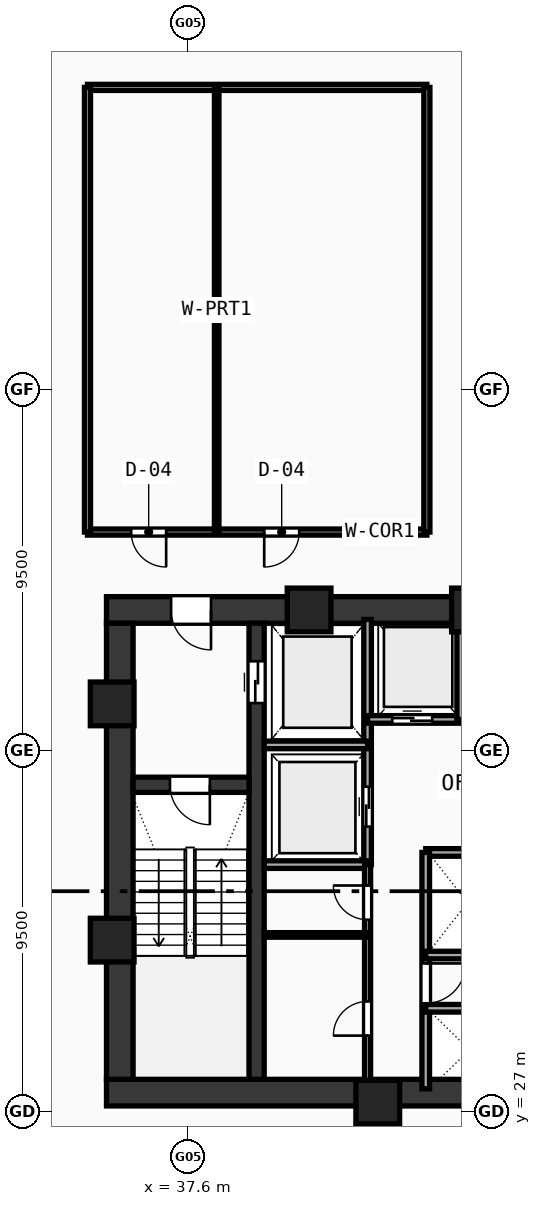
"""IFC4 building model, lengths in metres.
Left out: names, types, materials, properties, quantities, classifications, styles, units other than length and angle.
Written with IfcOpenShell. Run it as: python <this file> out.ifc"""

import sys

from ifc_helpers import new_model, si_unit, direction, frame, frame_2d, origin, origin_with_axes, origin_2d, place, context, subcontext, project, spatial, rectangle, hollow_rectangle, extrude, source, transform, mapped, element, fill, save


model = new_model("IFC4")
c1 = context("Model", 3, precision=1e-05, world=origin(), true_north=direction((0.0, 1.0)))
c2 = subcontext(c1, "Body", "Model", "MODEL_VIEW")
j1 = project(units=[si_unit("LENGTHUNIT", "METRE"), si_unit("PLANEANGLEUNIT", "RADIAN")], contexts=[c1])
p1 = place(None, origin())
s1 = spatial("IfcSite", under=j1, at=p1, CompositionType="ELEMENT")
p2 = place(p1, origin())
s2 = spatial("IfcBuilding", under=s1, at=p2, CompositionType="ELEMENT")
p3 = place(p2, frame((0.0, 0.0, 66.7)))
s3 = spatial("IfcBuildingStorey", under=s2, at=p3, CompositionType="ELEMENT", Elevation=66.7)
p4 = place(p3, frame((35.45, 27.5, 0.0), z_axis=(0.0, 0.0, 1.0), x_axis=(1.0, 0.0, 0.0)))
e1 = element("IfcWall", 1, at=p4, inside=s3, PredefinedType="SHEAR", context=c2, shape_type="SweptSolid", body=[
    extrude(rectangle(XDim=25.1, YDim=0.7, at=frame_2d((12.55, 0.0))), origin(), (0.0, 0.0, 1.0), 3.37),
])
p5 = place(p3, frame((35.45, 40.2, 0.0), z_axis=(0.0, 0.0, 1.0), x_axis=(1.0, 0.0, 0.0)))
e2 = element("IfcWall", 2, at=p5, inside=s3, PredefinedType="SHEAR", context=c2, shape_type="SweptSolid", body=[
    extrude(rectangle(XDim=11.35, YDim=0.7, at=frame_2d((5.675, 0.0))), origin(), (0.0, 0.0, 1.0), 3.37),
])
p6 = place(p5, frame((1.7, 0.0, 0.0)))
e3 = element("IfcOpeningElement", 3, at=p6, cuts=e2, PredefinedType="OPENING", context=c2, shape_type="SweptSolid", body=[
    extrude(rectangle(XDim=1.05, YDim=2.1, at=frame_2d((0.525, 1.05))), frame((0.0, 0.36, 0.0), z_axis=(0.0, -1.0, 0.0), x_axis=(1.0, 0.0, 0.0)), (0.0, 0.0, 1.0), 0.72),
])
p7 = place(p3, frame((35.8, 27.85, 0.0), z_axis=(0.0, 0.0, 1.0), x_axis=(0.0, 1.0, 0.0)))
e4 = element("IfcWall", 4, at=p7, inside=s3, PredefinedType="SHEAR", context=c2, shape_type="SweptSolid", body=[
    extrude(rectangle(XDim=12.0, YDim=0.7, at=frame_2d((6.0, 0.0))), origin(), (0.0, 0.0, 1.0), 3.37),
])
p8 = place(p3, frame((39.4, 27.85, 0.0), z_axis=(0.0, 0.0, 1.0), x_axis=(0.0, 1.0, 0.0)))
e5 = element("IfcWall", 5, at=p8, inside=s3, PredefinedType="SHEAR", context=c2, shape_type="SweptSolid", body=[
    extrude(rectangle(XDim=12.0, YDim=0.4, at=frame_2d((6.0, 0.0))), origin(), (0.0, 0.0, 1.0), 3.37),
])
p9 = place(p8, frame((9.9, 0.0, 0.0)))
e6 = element("IfcOpeningElement", 6, at=p9, cuts=e5, PredefinedType="OPENING", context=c2, shape_type="SweptSolid", body=[
    extrude(rectangle(XDim=1.1, YDim=2.1, at=frame_2d((0.55, 1.05))), frame((0.0, 0.21, 0.0), z_axis=(0.0, -1.0, 0.0), x_axis=(1.0, 0.0, 0.0)), (0.0, 0.0, 1.0), 0.42),
])
p10 = place(p3, frame((36.15, 35.6, 0.0), z_axis=(0.0, 0.0, 1.0), x_axis=(1.0, 0.0, 0.0)))
e7 = element("IfcWall", 7, at=p10, inside=s3, PredefinedType="SHEAR", context=c2, shape_type="SweptSolid", body=[
    extrude(rectangle(XDim=3.05, YDim=0.4, at=frame_2d((1.525, 0.0))), origin(), (0.0, 0.0, 1.0), 3.37),
])
p11 = place(p10, frame((0.97, 0.0, 0.0)))
e8 = element("IfcOpeningElement", 8, at=p11, cuts=e7, PredefinedType="OPENING", context=c2, shape_type="SweptSolid", body=[
    extrude(rectangle(XDim=1.05, YDim=2.1, at=frame_2d((0.525, 1.05))), frame((0.0, 0.21, 0.0), z_axis=(0.0, -1.0, 0.0), x_axis=(1.0, 0.0, 0.0)), (0.0, 0.0, 1.0), 0.42),
])
m1 = source(origin(), c2, "Body", "SweptSolid", [
    extrude(hollow_rectangle(XDim=1.15, YDim=1.15, WallThickness=0.048, at=origin_2d()), origin(), (0.0, 0.0, 1.0), 3.63),
])
for number, where, z_axis, x_axis in (
    (9, (42.588, 27.25, -0.26), (0.0, 0.0, 1.0), (1.0, 0.0, 0.0)),
    (10, (45.106, 40.2, -0.26), (0.0, 0.0, 1.0), (1.0, 0.0, 0.0)),
    (11, (40.781, 40.2, -0.26), (0.0, 0.0, 1.0), (1.0, 0.0, 0.0)),
    (12, (35.6, 37.729, -0.26), (0.0, 0.0, 1.0), (1.0, 0.0, 0.0)),
    (13, (35.6, 31.513, -0.26), (0.0, 0.0, 1.0), (1.0, 0.0, 0.0)),
):
    element("IfcColumn", number, at=place(p3, frame(where, z_axis=z_axis, x_axis=x_axis)), inside=s3, PredefinedType="COLUMN", context=c2, shape_type="MappedRepresentation", body=[
        mapped(m1, transform((0.0, 0.0, 0.0), scale=1.0)),
    ])
p12 = place(p3, frame((42.32, 33.5, 0.0), z_axis=(0.0, 0.0, 1.0), x_axis=(0.0, 1.0, 0.0)))
e14 = element("IfcWall", 14, at=p12, inside=s3, PredefinedType="SOLIDWALL", context=c2, shape_type="SweptSolid", body=[
    extrude(rectangle(XDim=6.45, YDim=0.2, at=frame_2d((3.225, 0.0))), origin(), (0.0, 0.0, 1.0), 3.37),
])
p13 = place(p12, frame((1.0, 0.0, 0.0)))
e15 = element("IfcOpeningElement", 15, at=p13, cuts=e14, PredefinedType="OPENING", context=c2, shape_type="SweptSolid", body=[
    extrude(rectangle(XDim=1.05, YDim=2.1, at=frame_2d((0.525, 1.05))), frame((0.0, 0.11, 0.0), z_axis=(0.0, -1.0, 0.0), x_axis=(1.0, 0.0, 0.0)), (0.0, 0.0, 1.0), 0.22),
])
for number, where, z_axis, x_axis in (
    (16, (39.6, 36.65, 0.0), (0.0, 0.0, 1.0), (1.0, 0.0, 0.0)),
    (17, (39.6, 33.5, 0.0), (0.0, 0.0, 1.0), (1.0, 0.0, 0.0)),
):
    element("IfcWall", number, at=place(p3, frame(where, z_axis=z_axis, x_axis=x_axis)), inside=s3, PredefinedType="SOLIDWALL", context=c2, shape_type="SweptSolid", body=[
        extrude(rectangle(XDim=2.72, YDim=0.2, at=frame_2d((1.36, 0.0))), origin(), (0.0, 0.0, 1.0), 3.37),
    ])
p14 = place(p3, frame((42.32, 37.32, 0.0), z_axis=(0.0, 0.0, 1.0), x_axis=(1.0, 0.0, 0.0)))
e18 = element("IfcWall", 18, at=p14, inside=s3, PredefinedType="SOLIDWALL", context=c2, shape_type="SweptSolid", body=[
    extrude(rectangle(XDim=4.73, YDim=0.2, at=frame_2d((2.365, 0.0))), origin(), (0.0, 0.0, 1.0), 3.37),
])
p15 = place(p14, frame((0.65, 0.0, 0.0)))
e19 = element("IfcOpeningElement", 19, at=p15, cuts=e18, PredefinedType="OPENING", context=c2, shape_type="SweptSolid", body=[
    extrude(rectangle(XDim=1.05, YDim=2.1, at=frame_2d((0.525, 1.05))), frame((0.0, 0.11, 0.0), z_axis=(0.0, -1.0, 0.0), x_axis=(1.0, 0.0, 0.0)), (0.0, 0.0, 1.0), 0.22),
])
p16 = place(p14, frame((2.95, 0.0, 0.0)))
e20 = element("IfcOpeningElement", 20, at=p16, cuts=e18, PredefinedType="OPENING", context=c2, shape_type="SweptSolid", body=[
    extrude(rectangle(XDim=1.05, YDim=2.1, at=frame_2d((0.525, 1.05))), frame((0.0, 0.11, 0.0), z_axis=(0.0, -1.0, 0.0), x_axis=(1.0, 0.0, 0.0)), (0.0, 0.0, 1.0), 0.22),
])
p17 = place(p3, frame((44.77, 37.32, 0.0), z_axis=(0.0, 0.0, 1.0), x_axis=(0.0, 1.0, 0.0)))
e21 = element("IfcWall", 21, at=p17, inside=s3, PredefinedType="SOLIDWALL", context=c2, shape_type="SweptSolid", body=[
    extrude(rectangle(XDim=2.63, YDim=0.2, at=frame_2d((1.315, 0.0))), origin(), (0.0, 0.0, 1.0), 3.37),
])
p18 = place(p3, frame((43.85, 33.82, 0.0), z_axis=(0.0, 0.0, 1.0), x_axis=(1.0, 0.0, 0.0)))
e22 = element("IfcWall", 22, at=p18, inside=s3, PredefinedType="SOLIDWALL", context=c2, shape_type="SweptSolid", body=[
    extrude(rectangle(XDim=9.83, YDim=0.2, at=frame_2d((4.915, 0.0))), origin(), (0.0, 0.0, 1.0), 3.37),
])
p19 = place(p3, frame((43.85, 27.6, 0.0), z_axis=(0.0, 0.0, 1.0), x_axis=(0.0, 1.0, 0.0)))
e23 = element("IfcWall", 23, at=p19, inside=s3, PredefinedType="SOLIDWALL", context=c2, shape_type="SweptSolid", body=[
    extrude(rectangle(XDim=6.22, YDim=0.2, at=frame_2d((3.11, 0.0))), origin(), (0.0, 0.0, 1.0), 3.37),
])
p20 = place(p19, frame((2.25, 0.0, 0.0)))
e24 = element("IfcOpeningElement", 24, at=p20, cuts=e23, PredefinedType="OPENING", context=c2, shape_type="SweptSolid", body=[
    extrude(rectangle(XDim=1.05, YDim=2.1, at=frame_2d((0.525, 1.05))), frame((0.0, 0.11, 0.0), z_axis=(0.0, -1.0, 0.0), x_axis=(1.0, 0.0, 0.0)), (0.0, 0.0, 1.0), 0.22),
])
p21 = place(p3, frame((43.85, 29.72, 0.0), z_axis=(0.0, 0.0, 1.0), x_axis=(1.0, 0.0, 0.0)))
e25 = element("IfcWall", 25, at=p21, inside=s3, PredefinedType="SOLIDWALL", context=c2, shape_type="SweptSolid", body=[
    extrude(rectangle(XDim=7.2, YDim=0.2, at=frame_2d((3.6, 0.0))), origin(), (0.0, 0.0, 1.0), 3.37),
])
p22 = place(p3, frame((43.85, 31.12, 0.0), z_axis=(0.0, 0.0, 1.0), x_axis=(1.0, 0.0, 0.0)))
e26 = element("IfcWall", 26, at=p22, inside=s3, PredefinedType="SOLIDWALL", context=c2, shape_type="SweptSolid", body=[
    extrude(rectangle(XDim=9.83, YDim=0.2, at=frame_2d((4.915, 0.0))), origin(), (0.0, 0.0, 1.0), 3.37),
])
p23 = place(p3, frame((42.32, 27.6, 0.0), z_axis=(0.0, 0.0, 1.0), x_axis=(0.0, 1.0, 0.0)))
e27 = element("IfcWall", 27, at=p23, inside=s3, PredefinedType="PARTITIONING", context=c2, shape_type="SweptSolid", body=[
    extrude(rectangle(XDim=5.9, YDim=0.16, at=frame_2d((2.95, 0.0))), origin(), (0.0, 0.0, 1.0), 3.37),
])
p24 = place(p23, frame((1.4, 0.0, 0.0)))
e28 = element("IfcOpeningElement", 28, at=p24, cuts=e27, PredefinedType="OPENING", context=c2, shape_type="SweptSolid", body=[
    extrude(rectangle(XDim=0.9, YDim=2.1, at=frame_2d((0.45, 1.05))), frame((0.0, 0.09, 0.0), z_axis=(0.0, -1.0, 0.0), x_axis=(1.0, 0.0, 0.0)), (0.0, 0.0, 1.0), 0.18),
])
p25 = place(p23, frame((4.45, 0.0, 0.0)))
e29 = element("IfcOpeningElement", 29, at=p25, cuts=e27, PredefinedType="OPENING", context=c2, shape_type="SweptSolid", body=[
    extrude(rectangle(XDim=0.9, YDim=2.1, at=frame_2d((0.45, 1.05))), frame((0.0, 0.09, 0.0), z_axis=(0.0, -1.0, 0.0), x_axis=(1.0, 0.0, 0.0)), (0.0, 0.0, 1.0), 0.18),
])
p26 = place(p3, frame((39.6, 31.65, 0.0), z_axis=(0.0, 0.0, 1.0), x_axis=(1.0, 0.0, 0.0)))
e30 = element("IfcWall", 30, at=p26, inside=s3, PredefinedType="PARTITIONING", context=c2, shape_type="SweptSolid", body=[
    extrude(rectangle(XDim=2.72, YDim=0.12, at=frame_2d((1.36, 0.0))), origin(), (0.0, 0.0, 1.0), 3.37),
])
p27 = place(p3, frame((34.95, 42.25, 0.0), z_axis=(0.0, 0.0, 1.0), x_axis=(1.0, 0.0, 0.0)))
e31 = element("IfcWall", 31, at=p27, inside=s3, PredefinedType="PARTITIONING", context=c2, shape_type="SweptSolid", body=[
    extrude(rectangle(XDim=8.93, YDim=0.16, at=frame_2d((4.465, 0.0))), origin(), (0.0, 0.0, 1.0), 2.67),
])
p28 = place(p27, frame((1.15, 0.0, 0.0)))
e32 = element("IfcOpeningElement", 32, at=p28, cuts=e31, PredefinedType="OPENING", context=c2, shape_type="SweptSolid", body=[
    extrude(rectangle(XDim=0.92, YDim=2.1, at=frame_2d((0.46, 1.05))), frame((0.0, 0.09, 0.0), z_axis=(0.0, -1.0, 0.0), x_axis=(1.0, 0.0, 0.0)), (0.0, 0.0, 1.0), 0.18),
])
p29 = place(p27, frame((4.65, 0.0, 0.0)))
e33 = element("IfcOpeningElement", 33, at=p29, cuts=e31, PredefinedType="OPENING", context=c2, shape_type="SweptSolid", body=[
    extrude(rectangle(XDim=0.92, YDim=2.1, at=frame_2d((0.46, 1.05))), frame((0.0, 0.09, 0.0), z_axis=(0.0, -1.0, 0.0), x_axis=(1.0, 0.0, 0.0)), (0.0, 0.0, 1.0), 0.18),
])
p30 = place(p3, frame((34.95, 53.95, 0.0), z_axis=(0.0, 0.0, 1.0), x_axis=(1.0, 0.0, 0.0)))
e34 = element("IfcWall", 34, at=p30, inside=s3, PredefinedType="PARTITIONING", context=c2, shape_type="SweptSolid", body=[
    extrude(rectangle(XDim=8.93, YDim=0.16, at=frame_2d((4.465, 0.0))), origin(), (0.0, 0.0, 1.0), 2.67),
])
for number, where, z_axis, x_axis in (
    (35, (34.95, 42.25, 0.0), (0.0, 0.0, 1.0), (0.0, 1.0, 0.0)),
    (36, (43.88, 42.25, 0.0), (0.0, 0.0, 1.0), (0.0, 1.0, 0.0)),
):
    element("IfcWall", number, at=place(p3, frame(where, z_axis=z_axis, x_axis=x_axis)), inside=s3, PredefinedType="PARTITIONING", context=c2, shape_type="SweptSolid", body=[
        extrude(rectangle(XDim=11.7, YDim=0.16, at=frame_2d((5.85, 0.0))), origin(), (0.0, 0.0, 1.0), 2.67),
    ])
p31 = place(p3, frame((38.35, 42.25, 0.0), z_axis=(0.0, 0.0, 1.0), x_axis=(0.0, 1.0, 0.0)))
e37 = element("IfcWall", 37, at=p31, inside=s3, PredefinedType="PARTITIONING", context=c2, shape_type="SweptSolid", body=[
    extrude(rectangle(XDim=11.7, YDim=0.12, at=frame_2d((5.85, 0.0))), origin(), (0.0, 0.0, 1.0), 2.67),
])
m2 = source(origin(), c2, "Body", "SweptSolid", [
    extrude(rectangle(XDim=1.05, YDim=2.1, at=frame_2d((0.525, 1.05))), frame((0.0, 0.025, 0.0), z_axis=(0.0, -1.0, 0.0), x_axis=(1.0, 0.0, 0.0)), (0.0, 0.0, 1.0), 0.05),
])
p32 = place(p11, frame((1.05, 0.0, 0.0), z_axis=(0.0, 0.0, 1.0), x_axis=(-1.0, 0.0, 0.0)))
e38 = element("IfcDoor", 38, at=p32, inside=s3, OperationType="SINGLE_SWING_LEFT", PredefinedType="DOOR", context=c2, shape_type="MappedRepresentation", body=[
    mapped(m2, transform((0.0, 0.0, 0.0), scale=1.0)),
])
fill(e8, e38)
p33 = place(p6, frame((1.05, 0.0, 0.0), z_axis=(0.0, 0.0, 1.0), x_axis=(-1.0, 0.0, 0.0)))
e39 = element("IfcDoor", 39, at=p33, inside=s3, OperationType="SINGLE_SWING_LEFT", PredefinedType="DOOR", context=c2, shape_type="MappedRepresentation", body=[
    mapped(m2, transform((0.0, 0.0, 0.0), scale=1.0)),
])
fill(e3, e39)
m3 = source(origin(), c2, "Body", "SweptSolid", [
    extrude(rectangle(XDim=1.1, YDim=2.1, at=frame_2d((0.55, 1.05))), frame((0.0, 0.025, 0.0), z_axis=(0.0, -1.0, 0.0), x_axis=(1.0, 0.0, 0.0)), (0.0, 0.0, 1.0), 0.05),
])
p34 = place(p9, frame((1.1, 0.0, 0.0), z_axis=(0.0, 0.0, 1.0), x_axis=(-1.0, 0.0, 0.0)))
e40 = element("IfcDoor", 40, at=p34, inside=s3, OperationType="DOUBLE_DOOR_SLIDING", PredefinedType="DOOR", context=c2, shape_type="MappedRepresentation", body=[
    mapped(m3, transform((0.0, 0.0, 0.0), scale=1.0)),
])
fill(e6, e40)
p35 = place(p13, origin_with_axes())
e41 = element("IfcDoor", 41, at=p35, inside=s3, OperationType="DOUBLE_DOOR_SLIDING", PredefinedType="DOOR", context=c2, shape_type="MappedRepresentation", body=[
    mapped(m2, transform((0.0, 0.0, 0.0), scale=1.0)),
])
fill(e15, e41)
p36 = place(p15, frame((1.05, 0.0, 0.0), z_axis=(0.0, 0.0, 1.0), x_axis=(-1.0, 0.0, 0.0)))
e42 = element("IfcDoor", 42, at=p36, inside=s3, OperationType="DOUBLE_DOOR_SLIDING", PredefinedType="DOOR", context=c2, shape_type="MappedRepresentation", body=[
    mapped(m2, transform((0.0, 0.0, 0.0), scale=1.0)),
])
fill(e19, e42)
p37 = place(p20, frame((1.05, 0.0, 0.0), z_axis=(0.0, 0.0, 1.0), x_axis=(-1.0, 0.0, 0.0)))
e43 = element("IfcDoor", 43, at=p37, inside=s3, OperationType="SINGLE_SWING_LEFT", PredefinedType="DOOR", context=c2, shape_type="MappedRepresentation", body=[
    mapped(m2, transform((0.0, 0.0, 0.0), scale=1.0)),
])
fill(e24, e43)
m4 = source(origin(), c2, "Body", "SweptSolid", [
    extrude(rectangle(XDim=0.9, YDim=2.1, at=frame_2d((0.45, 1.05))), frame((0.0, 0.025, 0.0), z_axis=(0.0, -1.0, 0.0), x_axis=(1.0, 0.0, 0.0)), (0.0, 0.0, 1.0), 0.05),
])
p38 = place(p24, origin_with_axes())
e44 = element("IfcDoor", 44, at=p38, inside=s3, OperationType="SINGLE_SWING_LEFT", PredefinedType="DOOR", context=c2, shape_type="MappedRepresentation", body=[
    mapped(m4, transform((0.0, 0.0, 0.0), scale=1.0)),
])
fill(e28, e44)
p39 = place(p25, origin_with_axes())
e45 = element("IfcDoor", 45, at=p39, inside=s3, OperationType="SINGLE_SWING_RIGHT", PredefinedType="DOOR", context=c2, shape_type="MappedRepresentation", body=[
    mapped(m4, transform((0.0, 0.0, 0.0), scale=1.0)),
])
fill(e29, e45)
m5 = source(origin(), c2, "Body", "SweptSolid", [
    extrude(rectangle(XDim=0.92, YDim=2.1, at=frame_2d((0.46, 1.05))), frame((0.0, 0.025, 0.0), z_axis=(0.0, -1.0, 0.0), x_axis=(1.0, 0.0, 0.0)), (0.0, 0.0, 1.0), 0.05),
])
p40 = place(p28, frame((0.92, 0.0, 0.0), z_axis=(0.0, 0.0, 1.0), x_axis=(-1.0, 0.0, 0.0)))
e46 = element("IfcDoor", 46, at=p40, inside=s3, OperationType="SINGLE_SWING_LEFT", PredefinedType="DOOR", context=c2, shape_type="MappedRepresentation", body=[
    mapped(m5, transform((0.0, 0.0, 0.0), scale=1.0)),
])
fill(e32, e46)
p41 = place(p29, frame((0.92, 0.0, 0.0), z_axis=(0.0, 0.0, 1.0), x_axis=(-1.0, 0.0, 0.0)))
e47 = element("IfcDoor", 47, at=p41, inside=s3, OperationType="SINGLE_SWING_RIGHT", PredefinedType="DOOR", context=c2, shape_type="MappedRepresentation", body=[
    mapped(m5, transform((0.0, 0.0, 0.0), scale=1.0)),
])
fill(e33, e47)
save(model, sys.argv[1])
